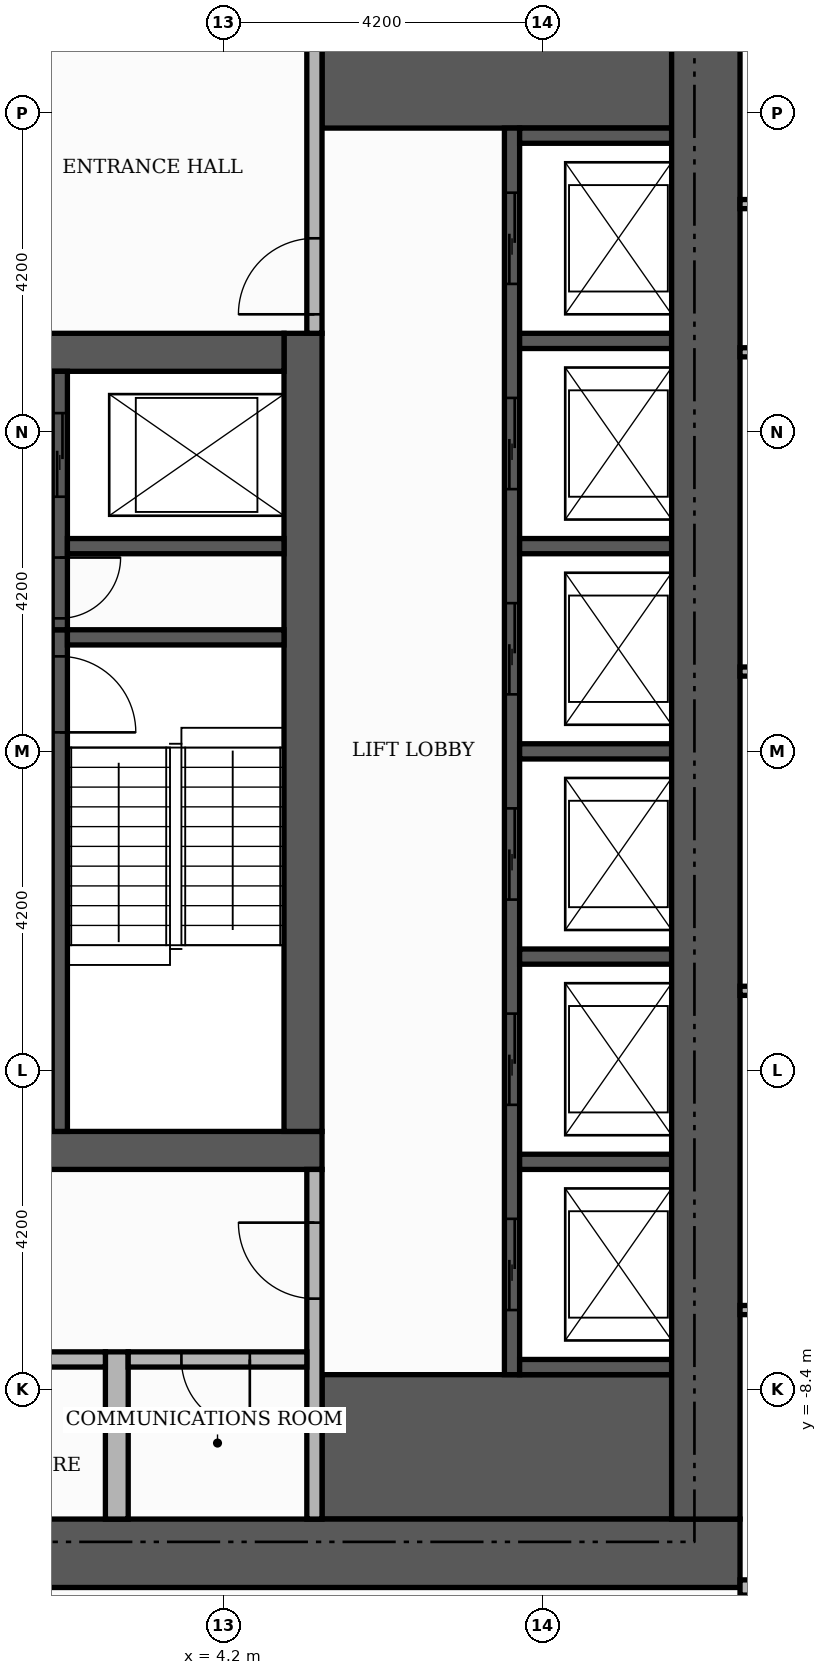
"""IFC4 building model, lengths in metres.
Left out: names, types, materials, properties, quantities, classifications, styles, units other than length and angle.
Written with IfcOpenShell. Run it as: python <this file> out.ifc"""

import sys

from ifc_helpers import new_model, si_unit, direction, frame, frame_2d, origin, place, context, subcontext, project, spatial, rectangle, extrude, element, fill, save


model = new_model("IFC4")
c1 = context("Model", 3, precision=1e-05, world=origin(), true_north=direction((0.0, 1.0)))
c2 = subcontext(c1, "Body", "Model", "MODEL_VIEW")
j1 = project(units=[si_unit("LENGTHUNIT", "METRE"), si_unit("PLANEANGLEUNIT", "RADIAN")], contexts=[c1])
p1 = place(None, origin())
s1 = spatial("IfcSite", under=j1, at=p1, CompositionType="ELEMENT")
p2 = place(p1, origin())
s2 = spatial("IfcBuilding", under=s1, at=p2, CompositionType="ELEMENT")
p3 = place(p2, frame((0.0, 0.0, 279.6)))
s3 = spatial("IfcBuildingStorey", under=s2, at=p3, CompositionType="ELEMENT", Elevation=279.6)
p4 = place(p3, frame((-5.5, -5.25, 0.0), z_axis=(0.0, 0.0, 1.0), x_axis=(1.0, 0.0, 0.0)))
e1 = element("IfcWall", 1, at=p4, inside=s3, PredefinedType="SHEAR", context=c2, shape_type="SweptSolid", body=[
    extrude(rectangle(XDim=11.0, YDim=0.5, at=frame_2d((5.5, 0.0))), origin(), (0.0, 0.0, 1.0), 3.48),
])
p5 = place(p4, frame((4.9, 0.0, 0.0)))
e2 = element("IfcOpeningElement", 2, at=p5, cuts=e1, PredefinedType="OPENING", context=c2, shape_type="SweptSolid", body=[
    extrude(rectangle(XDim=1.2, YDim=2.1, at=frame_2d((0.6, 1.05))), frame((0.0, 0.26, 0.0), z_axis=(0.0, -1.0, 0.0), x_axis=(1.0, 0.0, 0.0)), (0.0, 0.0, 1.0), 0.52),
])
p6 = place(p3, frame((5.25, -5.0, 0.0), z_axis=(0.0, 0.0, 1.0), x_axis=(0.0, 1.0, 0.0)))
e3 = element("IfcWall", 3, at=p6, inside=s3, PredefinedType="SHEAR", context=c2, shape_type="SweptSolid", body=[
    extrude(rectangle(XDim=10.5, YDim=0.5, at=frame_2d((5.25, 0.0))), origin(), (0.0, 0.0, 1.0), 3.48),
])
p7 = place(p3, frame((-5.0, 5.25, 0.0), z_axis=(0.0, 0.0, 1.0), x_axis=(1.0, 0.0, 0.0)))
e4 = element("IfcWall", 4, at=p7, inside=s3, PredefinedType="SHEAR", context=c2, shape_type="SweptSolid", body=[
    extrude(rectangle(XDim=10.0, YDim=0.5, at=frame_2d((5.0, 0.0))), origin(), (0.0, 0.0, 1.0), 3.48),
])
p8 = place(p7, frame((4.4, 0.0, 0.0)))
e5 = element("IfcOpeningElement", 5, at=p8, cuts=e4, PredefinedType="OPENING", context=c2, shape_type="SweptSolid", body=[
    extrude(rectangle(XDim=1.2, YDim=2.1, at=frame_2d((0.6, 1.05))), frame((0.0, 0.26, 0.0), z_axis=(0.0, -1.0, 0.0), x_axis=(1.0, 0.0, 0.0)), (0.0, 0.0, 1.0), 0.52),
])
for number, where, z_axis, x_axis in (
    (6, (5.5, -9.15, 0.0), (0.0, 0.0, 1.0), (1.0, 0.0, 0.0)),
    (7, (5.5, 9.15, 0.0), (0.0, 0.0, 1.0), (1.0, 0.0, 0.0)),
):
    element("IfcWall", number, at=place(p3, frame(where, z_axis=z_axis, x_axis=x_axis)), inside=s3, PredefinedType="SHEAR", context=c2, shape_type="SweptSolid", body=[
        extrude(rectangle(XDim=4.6, YDim=1.9, at=frame_2d((2.3, 0.0))), origin(), (0.0, 0.0, 1.0), 3.48),
    ])
p9 = place(p3, frame((2.05, -5.0, 0.0), z_axis=(0.0, 0.0, 1.0), x_axis=(0.0, 1.0, 0.0)))
e8 = element("IfcWall", 8, at=p9, inside=s3, PredefinedType="SHEAR", context=c2, shape_type="SweptSolid", body=[
    extrude(rectangle(XDim=6.6, YDim=0.2, at=frame_2d((3.3, 0.0))), origin(), (0.0, 0.0, 1.0), 3.48),
])
p10 = place(p9, frame((5.25, 0.0, 0.0)))
e9 = element("IfcOpeningElement", 9, at=p10, cuts=e8, PredefinedType="OPENING", context=c2, shape_type="SweptSolid", body=[
    extrude(rectangle(XDim=1.0, YDim=2.1, at=frame_2d((0.5, 1.05))), frame((0.0, 0.11, 0.0), z_axis=(0.0, -1.0, 0.0), x_axis=(1.0, 0.0, 0.0)), (0.0, 0.0, 1.0), 0.22),
])
p11 = place(p3, frame((2.15, 1.5, 0.0), z_axis=(0.0, 0.0, 1.0), x_axis=(1.0, 0.0, 0.0)))
e10 = element("IfcWall", 10, at=p11, inside=s3, PredefinedType="SHEAR", context=c2, shape_type="SweptSolid", body=[
    extrude(rectangle(XDim=2.85, YDim=0.2, at=frame_2d((1.425, 0.0))), origin(), (0.0, 0.0, 1.0), 3.48),
])
p12 = place(p3, frame((8.0, -8.2, 0.0), z_axis=(0.0, 0.0, 1.0), x_axis=(0.0, 1.0, 0.0)))
e11 = element("IfcWall", 11, at=p12, inside=s3, PredefinedType="SHEAR", context=c2, shape_type="SweptSolid", body=[
    extrude(rectangle(XDim=16.4, YDim=0.2, at=frame_2d((8.2, 0.0))), origin(), (0.0, 0.0, 1.0), 3.48),
])
p13 = place(p12, frame((0.85, 0.0, 0.0)))
e12 = element("IfcOpeningElement", 12, at=p13, cuts=e11, PredefinedType="OPENING", context=c2, shape_type="SweptSolid", body=[
    extrude(rectangle(XDim=1.2, YDim=2.1, at=frame_2d((0.6, 1.05))), frame((0.0, 0.11, 0.0), z_axis=(0.0, -1.0, 0.0), x_axis=(1.0, 0.0, 0.0)), (0.0, 0.0, 1.0), 0.22),
])
p14 = place(p12, frame((3.55, 0.0, 0.0)))
e13 = element("IfcOpeningElement", 13, at=p14, cuts=e11, PredefinedType="OPENING", context=c2, shape_type="SweptSolid", body=[
    extrude(rectangle(XDim=1.2, YDim=2.1, at=frame_2d((0.6, 1.05))), frame((0.0, 0.11, 0.0), z_axis=(0.0, -1.0, 0.0), x_axis=(1.0, 0.0, 0.0)), (0.0, 0.0, 1.0), 0.22),
])
p15 = place(p12, frame((6.25, 0.0, 0.0)))
e14 = element("IfcOpeningElement", 14, at=p15, cuts=e11, PredefinedType="OPENING", context=c2, shape_type="SweptSolid", body=[
    extrude(rectangle(XDim=1.2, YDim=2.1, at=frame_2d((0.6, 1.05))), frame((0.0, 0.11, 0.0), z_axis=(0.0, -1.0, 0.0), x_axis=(1.0, 0.0, 0.0)), (0.0, 0.0, 1.0), 0.22),
])
p16 = place(p12, frame((8.95, 0.0, 0.0)))
e15 = element("IfcOpeningElement", 15, at=p16, cuts=e11, PredefinedType="OPENING", context=c2, shape_type="SweptSolid", body=[
    extrude(rectangle(XDim=1.2, YDim=2.1, at=frame_2d((0.6, 1.05))), frame((0.0, 0.11, 0.0), z_axis=(0.0, -1.0, 0.0), x_axis=(1.0, 0.0, 0.0)), (0.0, 0.0, 1.0), 0.22),
])
p17 = place(p12, frame((11.65, 0.0, 0.0)))
e16 = element("IfcOpeningElement", 16, at=p17, cuts=e11, PredefinedType="OPENING", context=c2, shape_type="SweptSolid", body=[
    extrude(rectangle(XDim=1.2, YDim=2.1, at=frame_2d((0.6, 1.05))), frame((0.0, 0.11, 0.0), z_axis=(0.0, -1.0, 0.0), x_axis=(1.0, 0.0, 0.0)), (0.0, 0.0, 1.0), 0.22),
])
p18 = place(p12, frame((14.35, 0.0, 0.0)))
e17 = element("IfcOpeningElement", 17, at=p18, cuts=e11, PredefinedType="OPENING", context=c2, shape_type="SweptSolid", body=[
    extrude(rectangle(XDim=1.2, YDim=2.1, at=frame_2d((0.6, 1.05))), frame((0.0, 0.11, 0.0), z_axis=(0.0, -1.0, 0.0), x_axis=(1.0, 0.0, 0.0)), (0.0, 0.0, 1.0), 0.22),
])
for number, where, z_axis, x_axis in (
    (18, (8.1, -8.1, 0.0), (0.0, 0.0, 1.0), (1.0, 0.0, 0.0)),
    (19, (8.1, -5.4, 0.0), (0.0, 0.0, 1.0), (1.0, 0.0, 0.0)),
    (20, (8.1, -2.7, 0.0), (0.0, 0.0, 1.0), (1.0, 0.0, 0.0)),
    (21, (8.1, 0.0, 0.0), (0.0, 0.0, 1.0), (1.0, 0.0, 0.0)),
):
    element("IfcWall", number, at=place(p3, frame(where, z_axis=z_axis, x_axis=x_axis)), inside=s3, PredefinedType="SHEAR", context=c2, shape_type="SweptSolid", body=[
        extrude(rectangle(XDim=2.0, YDim=0.2, at=frame_2d((1.0, 0.0))), origin(), (0.0, 0.0, 1.0), 3.48),
    ])
p19 = place(p3, frame((2.05, 1.6, 0.0), z_axis=(0.0, 0.0, 1.0), x_axis=(0.0, 1.0, 0.0)))
e22 = element("IfcWall", 22, at=p19, inside=s3, PredefinedType="SHEAR", context=c2, shape_type="SweptSolid", body=[
    extrude(rectangle(XDim=3.4, YDim=0.2, at=frame_2d((1.7, 0.0))), origin(), (0.0, 0.0, 1.0), 3.48),
])
p20 = place(p19, frame((1.75, 0.0, 0.0)))
e23 = element("IfcOpeningElement", 23, at=p20, cuts=e22, PredefinedType="OPENING", context=c2, shape_type="SweptSolid", body=[
    extrude(rectangle(XDim=1.1, YDim=2.1, at=frame_2d((0.55, 1.05))), frame((0.0, 0.11, 0.0), z_axis=(0.0, -1.0, 0.0), x_axis=(1.0, 0.0, 0.0)), (0.0, 0.0, 1.0), 0.22),
])
p21 = place(p19, frame((0.15, 0.0, 0.0)))
e24 = element("IfcOpeningElement", 24, at=p21, cuts=e22, PredefinedType="OPENING", context=c2, shape_type="SweptSolid", body=[
    extrude(rectangle(XDim=0.8, YDim=2.1, at=frame_2d((0.4, 1.05))), frame((0.0, 0.11, 0.0), z_axis=(0.0, -1.0, 0.0), x_axis=(1.0, 0.0, 0.0)), (0.0, 0.0, 1.0), 0.22),
])
p22 = place(p3, frame((2.15, 2.7, 0.0), z_axis=(0.0, 0.0, 1.0), x_axis=(1.0, 0.0, 0.0)))
e25 = element("IfcWall", 25, at=p22, inside=s3, PredefinedType="SHEAR", context=c2, shape_type="SweptSolid", body=[
    extrude(rectangle(XDim=2.85, YDim=0.2, at=frame_2d((1.425, 0.0))), origin(), (0.0, 0.0, 1.0), 3.48),
])
for number, where, z_axis, x_axis in (
    (26, (8.1, 2.7, 0.0), (0.0, 0.0, 1.0), (1.0, 0.0, 0.0)),
    (27, (8.1, 5.4, 0.0), (0.0, 0.0, 1.0), (1.0, 0.0, 0.0)),
    (28, (8.1, 8.1, 0.0), (0.0, 0.0, 1.0), (1.0, 0.0, 0.0)),
):
    element("IfcWall", number, at=place(p3, frame(where, z_axis=z_axis, x_axis=x_axis)), inside=s3, PredefinedType="SHEAR", context=c2, shape_type="SweptSolid", body=[
        extrude(rectangle(XDim=2.0, YDim=0.2, at=frame_2d((1.0, 0.0))), origin(), (0.0, 0.0, 1.0), 3.48),
    ])
p23 = place(p3, frame((-11.0, -10.55, 0.0), z_axis=(0.0, 0.0, 1.0), x_axis=(1.0, 0.0, 0.0)))
e29 = element("IfcWall", 29, at=p23, inside=s3, PredefinedType="SHEAR", context=c2, shape_type="SweptSolid", body=[
    extrude(rectangle(XDim=22.0, YDim=0.9, at=frame_2d((11.0, 0.0))), origin(), (0.0, 0.0, 1.0), 3.48),
])
p24 = place(p23, frame((7.4, 0.0, 0.0)))
e30 = element("IfcOpeningElement", 30, at=p24, cuts=e29, PredefinedType="OPENING", context=c2, shape_type="SweptSolid", body=[
    extrude(rectangle(XDim=1.8, YDim=2.2, at=frame_2d((0.9, 1.1))), frame((0.0, 0.46, 0.0), z_axis=(0.0, -1.0, 0.0), x_axis=(1.0, 0.0, 0.0)), (0.0, 0.0, 1.0), 0.92),
])
p25 = place(p3, frame((10.55, -10.1, 0.0), z_axis=(0.0, 0.0, 1.0), x_axis=(0.0, 1.0, 0.0)))
e31 = element("IfcWall", 31, at=p25, inside=s3, PredefinedType="SHEAR", context=c2, shape_type="SweptSolid", body=[
    extrude(rectangle(XDim=20.2, YDim=0.9, at=frame_2d((10.1, 0.0))), origin(), (0.0, 0.0, 1.0), 3.48),
])
p26 = place(p3, frame((2.8, -10.1, 0.0), z_axis=(0.0, 0.0, 1.0), x_axis=(0.0, 1.0, 0.0)))
e32 = element("IfcWall", 32, at=p26, inside=s3, PredefinedType="PARTITIONING", context=c2, shape_type="SweptSolid", body=[
    extrude(rectangle(XDim=2.2, YDim=0.3, at=frame_2d((1.1, 0.0))), origin(), (0.0, 0.0, 1.0), 3.48),
])
p27 = place(p3, frame((5.4, -10.1, 0.0), z_axis=(0.0, 0.0, 1.0), x_axis=(0.0, 1.0, 0.0)))
e33 = element("IfcWall", 33, at=p27, inside=s3, PredefinedType="PARTITIONING", context=c2, shape_type="SweptSolid", body=[
    extrude(rectangle(XDim=4.6, YDim=0.2, at=frame_2d((2.3, 0.0))), origin(), (0.0, 0.0, 1.0), 3.48),
])
p28 = place(p27, frame((2.9, 0.0, 0.0)))
e34 = element("IfcOpeningElement", 34, at=p28, cuts=e33, PredefinedType="OPENING", context=c2, shape_type="SweptSolid", body=[
    extrude(rectangle(XDim=1.0, YDim=2.1, at=frame_2d((0.5, 1.05))), frame((0.0, 0.11, 0.0), z_axis=(0.0, -1.0, 0.0), x_axis=(1.0, 0.0, 0.0)), (0.0, 0.0, 1.0), 0.22),
])
p29 = place(p3, frame((0.1, -8.0, 0.0), z_axis=(0.0, 0.0, 1.0), x_axis=(1.0, 0.0, 0.0)))
e35 = element("IfcWall", 35, at=p29, inside=s3, PredefinedType="PARTITIONING", context=c2, shape_type="SweptSolid", body=[
    extrude(rectangle(XDim=2.55, YDim=0.2, at=frame_2d((1.275, 0.0))), origin(), (0.0, 0.0, 1.0), 3.48),
])
p30 = place(p29, frame((0.85, 0.0, 0.0)))
e36 = element("IfcOpeningElement", 36, at=p30, cuts=e35, PredefinedType="OPENING", context=c2, shape_type="SweptSolid", body=[
    extrude(rectangle(XDim=0.9, YDim=2.1, at=frame_2d((0.45, 1.05))), frame((0.0, 0.11, 0.0), z_axis=(0.0, -1.0, 0.0), x_axis=(1.0, 0.0, 0.0)), (0.0, 0.0, 1.0), 0.22),
])
p31 = place(p3, frame((2.95, -8.0, 0.0), z_axis=(0.0, 0.0, 1.0), x_axis=(1.0, 0.0, 0.0)))
e37 = element("IfcWall", 37, at=p31, inside=s3, PredefinedType="PARTITIONING", context=c2, shape_type="SweptSolid", body=[
    extrude(rectangle(XDim=2.35, YDim=0.2, at=frame_2d((1.175, 0.0))), origin(), (0.0, 0.0, 1.0), 3.48),
])
p32 = place(p31, frame((0.7, 0.0, 0.0)))
e38 = element("IfcOpeningElement", 38, at=p32, cuts=e37, PredefinedType="OPENING", context=c2, shape_type="SweptSolid", body=[
    extrude(rectangle(XDim=0.9, YDim=2.1, at=frame_2d((0.45, 1.05))), frame((0.0, 0.11, 0.0), z_axis=(0.0, -1.0, 0.0), x_axis=(1.0, 0.0, 0.0)), (0.0, 0.0, 1.0), 0.22),
])
p33 = place(p3, frame((5.4, 5.5, 0.0), z_axis=(0.0, 0.0, 1.0), x_axis=(0.0, 1.0, 0.0)))
e39 = element("IfcWall", 39, at=p33, inside=s3, PredefinedType="PARTITIONING", context=c2, shape_type="SweptSolid", body=[
    extrude(rectangle(XDim=4.6, YDim=0.2, at=frame_2d((2.3, 0.0))), origin(), (0.0, 0.0, 1.0), 3.48),
])
p34 = place(p33, frame((0.25, 0.0, 0.0)))
e40 = element("IfcOpeningElement", 40, at=p34, cuts=e39, PredefinedType="OPENING", context=c2, shape_type="SweptSolid", body=[
    extrude(rectangle(XDim=1.0, YDim=2.1, at=frame_2d((0.5, 1.05))), frame((0.0, 0.11, 0.0), z_axis=(0.0, -1.0, 0.0), x_axis=(1.0, 0.0, 0.0)), (0.0, 0.0, 1.0), 0.22),
])
p35 = place(p3, frame((11.0, -11.0, 0.0), z_axis=(0.0, 0.0, 1.0), x_axis=(1.0, 0.0, 0.0)))
e41 = element("IfcWall", 41, at=p35, inside=s3, PredefinedType="PARTITIONING", context=c2, shape_type="SweptSolid", body=[
    extrude(rectangle(XDim=2.65, YDim=0.2, at=frame_2d((1.325, 0.0))), origin(), (0.0, 0.0, 1.0), 3.48),
])
p36 = place(p35, frame((0.775, 0.0, 0.0)))
e42 = element("IfcOpeningElement", 42, at=p36, cuts=e41, PredefinedType="OPENING", context=c2, shape_type="SweptSolid", body=[
    extrude(rectangle(XDim=1.1, YDim=2.4, at=frame_2d((0.55, 1.2))), frame((0.0, 0.11, 0.0), z_axis=(0.0, -1.0, 0.0), x_axis=(1.0, 0.0, 0.0)), (0.0, 0.0, 1.0), 0.22),
])
p37 = place(p3, frame((11.0, -7.35, 0.0), z_axis=(0.0, 0.0, 1.0), x_axis=(1.0, 0.0, 0.0)))
e43 = element("IfcWall", 43, at=p37, inside=s3, PredefinedType="PARTITIONING", context=c2, shape_type="SweptSolid", body=[
    extrude(rectangle(XDim=7.92, YDim=0.12, at=frame_2d((3.96, 0.0))), origin(), (0.0, 0.0, 1.0), 3.48),
])
p38 = place(p37, frame((3.51, 0.0, 0.0)))
e44 = element("IfcOpeningElement", 44, at=p38, cuts=e43, PredefinedType="OPENING", context=c2, shape_type="SweptSolid", body=[
    extrude(rectangle(XDim=0.9, YDim=2.1, at=frame_2d((0.45, 1.05))), frame((0.0, 0.07, 0.0), z_axis=(0.0, -1.0, 0.0), x_axis=(1.0, 0.0, 0.0)), (0.0, 0.0, 1.0), 0.14),
])
for number, where, z_axis, x_axis in (
    (45, (11.0, -3.15, 0.0), (0.0, 0.0, 1.0), (1.0, 0.0, 0.0)),
    (46, (11.0, 1.05, 0.0), (0.0, 0.0, 1.0), (1.0, 0.0, 0.0)),
    (47, (11.0, 5.25, 0.0), (0.0, 0.0, 1.0), (1.0, 0.0, 0.0)),
    (48, (11.0, 7.2, 0.0), (0.0, 0.0, 1.0), (1.0, 0.0, 0.0)),
):
    element("IfcWall", number, at=place(p3, frame(where, z_axis=z_axis, x_axis=x_axis)), inside=s3, PredefinedType="PARTITIONING", context=c2, shape_type="SweptSolid", body=[
        extrude(rectangle(XDim=7.92, YDim=0.12, at=frame_2d((3.96, 0.0))), origin(), (0.0, 0.0, 1.0), 3.48),
    ])
p39 = place(p13, origin())
e49 = element("IfcDoor", 49, at=p39, inside=s3, OperationType="SLIDING_TO_LEFT", PredefinedType="DOOR", context=c2, shape_type="SweptSolid", body=[
    extrude(rectangle(XDim=1.2, YDim=2.1, at=frame_2d((0.6, 1.05))), frame((0.0, 0.025, 0.0), z_axis=(0.0, -1.0, 0.0), x_axis=(1.0, 0.0, 0.0)), (0.0, 0.0, 1.0), 0.05),
])
fill(e12, e49)
p40 = place(p14, origin())
e50 = element("IfcDoor", 50, at=p40, inside=s3, OperationType="SLIDING_TO_LEFT", PredefinedType="DOOR", context=c2, shape_type="SweptSolid", body=[
    extrude(rectangle(XDim=1.2, YDim=2.1, at=frame_2d((0.6, 1.05))), frame((0.0, 0.025, 0.0), z_axis=(0.0, -1.0, 0.0), x_axis=(1.0, 0.0, 0.0)), (0.0, 0.0, 1.0), 0.05),
])
fill(e13, e50)
p41 = place(p15, origin())
e51 = element("IfcDoor", 51, at=p41, inside=s3, OperationType="SLIDING_TO_LEFT", PredefinedType="DOOR", context=c2, shape_type="SweptSolid", body=[
    extrude(rectangle(XDim=1.2, YDim=2.1, at=frame_2d((0.6, 1.05))), frame((0.0, 0.025, 0.0), z_axis=(0.0, -1.0, 0.0), x_axis=(1.0, 0.0, 0.0)), (0.0, 0.0, 1.0), 0.05),
])
fill(e14, e51)
p42 = place(p16, origin())
e52 = element("IfcDoor", 52, at=p42, inside=s3, OperationType="SLIDING_TO_LEFT", PredefinedType="DOOR", context=c2, shape_type="SweptSolid", body=[
    extrude(rectangle(XDim=1.2, YDim=2.1, at=frame_2d((0.6, 1.05))), frame((0.0, 0.025, 0.0), z_axis=(0.0, -1.0, 0.0), x_axis=(1.0, 0.0, 0.0)), (0.0, 0.0, 1.0), 0.05),
])
fill(e15, e52)
p43 = place(p17, origin())
e53 = element("IfcDoor", 53, at=p43, inside=s3, OperationType="SLIDING_TO_LEFT", PredefinedType="DOOR", context=c2, shape_type="SweptSolid", body=[
    extrude(rectangle(XDim=1.2, YDim=2.1, at=frame_2d((0.6, 1.05))), frame((0.0, 0.025, 0.0), z_axis=(0.0, -1.0, 0.0), x_axis=(1.0, 0.0, 0.0)), (0.0, 0.0, 1.0), 0.05),
])
fill(e16, e53)
p44 = place(p18, origin())
e54 = element("IfcDoor", 54, at=p44, inside=s3, OperationType="SLIDING_TO_LEFT", PredefinedType="DOOR", context=c2, shape_type="SweptSolid", body=[
    extrude(rectangle(XDim=1.2, YDim=2.1, at=frame_2d((0.6, 1.05))), frame((0.0, 0.025, 0.0), z_axis=(0.0, -1.0, 0.0), x_axis=(1.0, 0.0, 0.0)), (0.0, 0.0, 1.0), 0.05),
])
fill(e17, e54)
p45 = place(p20, origin())
e55 = element("IfcDoor", 55, at=p45, inside=s3, OperationType="SLIDING_TO_LEFT", PredefinedType="DOOR", context=c2, shape_type="SweptSolid", body=[
    extrude(rectangle(XDim=1.1, YDim=2.1, at=frame_2d((0.55, 1.05))), frame((0.0, 0.025, 0.0), z_axis=(0.0, -1.0, 0.0), x_axis=(1.0, 0.0, 0.0)), (0.0, 0.0, 1.0), 0.05),
])
fill(e23, e55)
p46 = place(p10, frame((1.0, 0.0, 0.0), z_axis=(0.0, 0.0, 1.0), x_axis=(-1.0, 0.0, 0.0)))
e56 = element("IfcDoor", 56, at=p46, inside=s3, OperationType="SINGLE_SWING_LEFT", PredefinedType="DOOR", context=c2, shape_type="SweptSolid", body=[
    extrude(rectangle(XDim=1.0, YDim=2.1, at=frame_2d((0.5, 1.05))), frame((0.0, 0.025, 0.0), z_axis=(0.0, -1.0, 0.0), x_axis=(1.0, 0.0, 0.0)), (0.0, 0.0, 1.0), 0.05),
])
fill(e9, e56)
p47 = place(p21, frame((0.8, 0.0, 0.0), z_axis=(0.0, 0.0, 1.0), x_axis=(-1.0, 0.0, 0.0)))
e57 = element("IfcDoor", 57, at=p47, inside=s3, OperationType="SINGLE_SWING_RIGHT", PredefinedType="DOOR", context=c2, shape_type="SweptSolid", body=[
    extrude(rectangle(XDim=0.8, YDim=2.1, at=frame_2d((0.4, 1.05))), frame((0.0, 0.025, 0.0), z_axis=(0.0, -1.0, 0.0), x_axis=(1.0, 0.0, 0.0)), (0.0, 0.0, 1.0), 0.05),
])
fill(e24, e57)
p48 = place(p34, origin())
e58 = element("IfcDoor", 58, at=p48, inside=s3, OperationType="SINGLE_SWING_LEFT", PredefinedType="DOOR", context=c2, shape_type="SweptSolid", body=[
    extrude(rectangle(XDim=1.0, YDim=2.1, at=frame_2d((0.5, 1.05))), frame((0.0, 0.025, 0.0), z_axis=(0.0, -1.0, 0.0), x_axis=(1.0, 0.0, 0.0)), (0.0, 0.0, 1.0), 0.05),
])
fill(e40, e58)
p49 = place(p28, origin())
e59 = element("IfcDoor", 59, at=p49, inside=s3, OperationType="SINGLE_SWING_RIGHT", PredefinedType="DOOR", context=c2, shape_type="SweptSolid", body=[
    extrude(rectangle(XDim=1.0, YDim=2.1, at=frame_2d((0.5, 1.05))), frame((0.0, 0.025, 0.0), z_axis=(0.0, -1.0, 0.0), x_axis=(1.0, 0.0, 0.0)), (0.0, 0.0, 1.0), 0.05),
])
fill(e34, e59)
p50 = place(p32, frame((0.9, 0.0, 0.0), z_axis=(0.0, 0.0, 1.0), x_axis=(-1.0, 0.0, 0.0)))
e60 = element("IfcDoor", 60, at=p50, inside=s3, OperationType="SINGLE_SWING_RIGHT", PredefinedType="DOOR", context=c2, shape_type="SweptSolid", body=[
    extrude(rectangle(XDim=0.9, YDim=2.1, at=frame_2d((0.45, 1.05))), frame((0.0, 0.025, 0.0), z_axis=(0.0, -1.0, 0.0), x_axis=(1.0, 0.0, 0.0)), (0.0, 0.0, 1.0), 0.05),
])
fill(e38, e60)
save(model, sys.argv[1])
